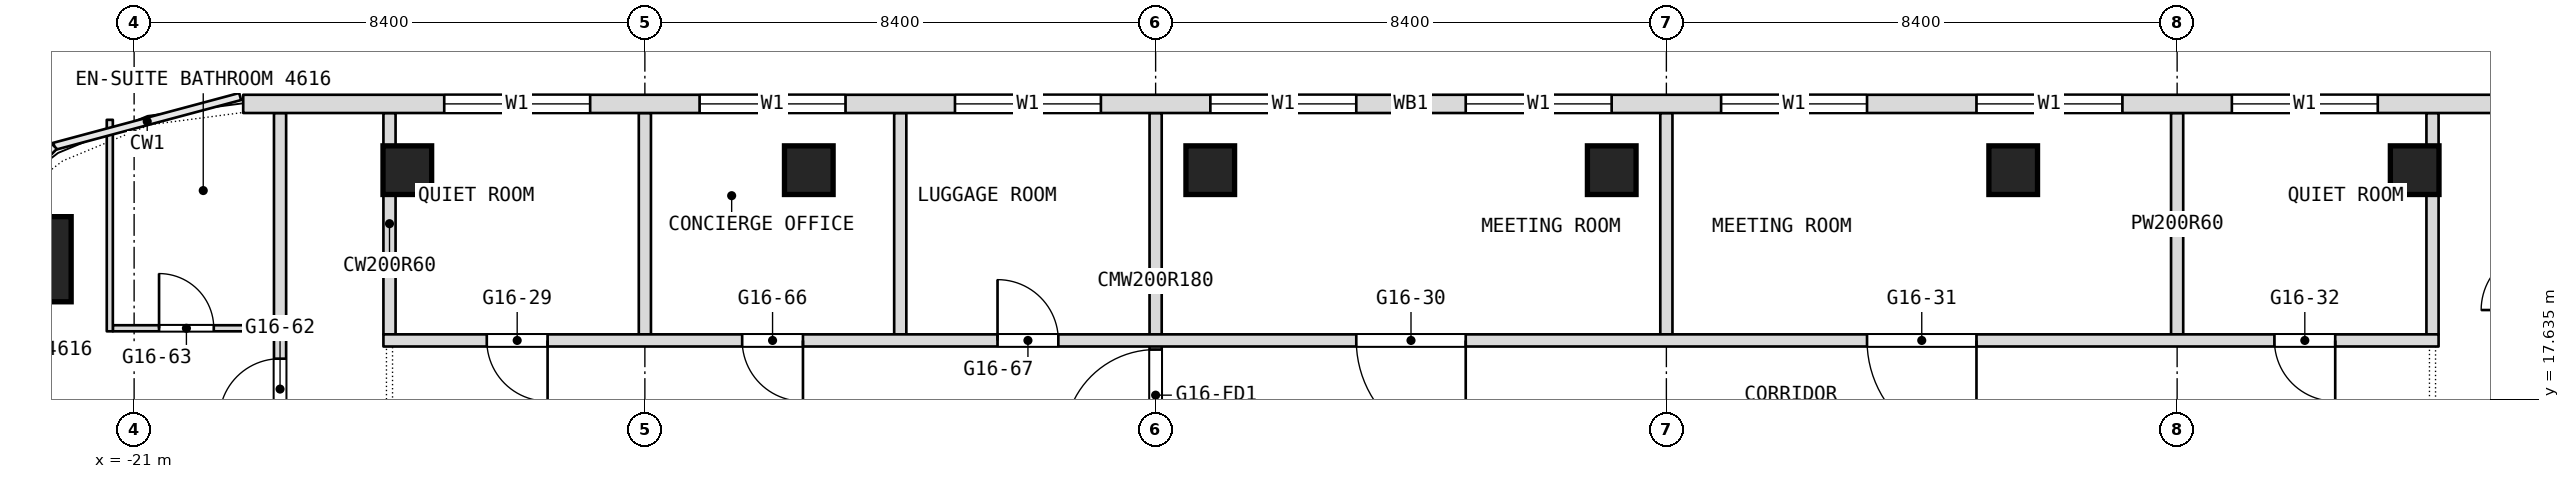
"""IFC4 building model, lengths in metres.
Left out: names, types, materials, properties, quantities, classifications, styles, units other than length and angle.
Written with IfcOpenShell. Run it as: python <this file> out.ifc"""

import sys

from ifc_helpers import new_model, si_unit, direction, frame, frame_2d, origin, origin_2d, place, context, subcontext, project, spatial, rectangle, extrude, element, fill, save


model = new_model("IFC4")
c1 = context("Model", 3, precision=1e-05, world=origin(), true_north=direction((0.0, 1.0)))
c2 = subcontext(c1, "Body", "Model", "MODEL_VIEW")
j1 = project(units=[si_unit("LENGTHUNIT", "METRE"), si_unit("PLANEANGLEUNIT", "RADIAN")], contexts=[c1])
p1 = place(None, origin())
s1 = spatial("IfcSite", under=j1, at=p1, CompositionType="ELEMENT")
p2 = place(p1, origin())
s2 = spatial("IfcBuilding", under=s1, at=p2, CompositionType="ELEMENT")
p3 = place(p2, frame((0.0, 0.0, 202.1)))
s3 = spatial("IfcBuildingStorey", under=s2, at=p3, CompositionType="ELEMENT", Elevation=202.1)
p4 = place(p3, frame((-22.736, 19.936, 0.0), z_axis=(0.0, 0.0, 1.0), x_axis=(1.0, 0.0, 0.0)))
e1 = element("IfcColumn", 1, at=p4, inside=s3, PredefinedType="COLUMN", context=c2, shape_type="SweptSolid", body=[
    extrude(rectangle(XDim=1.4, YDim=1.4, at=origin_2d()), origin(), (0.0, 0.0, 1.0), 3.6),
])
for number, where, z_axis, x_axis in (
    (2, (-16.507, 21.4, 0.0), (0.0, 0.0, 1.0), (1.0, 0.0, 0.0)),
    (3, (-9.904, 21.4, 0.0), (0.0, 0.0, 1.0), (1.0, 0.0, 0.0)),
    (4, (-3.302, 21.4, 0.0), (0.0, 0.0, 1.0), (1.0, 0.0, 0.0)),
    (5, (3.302, 21.4, 0.0), (0.0, 0.0, 1.0), (1.0, 0.0, 0.0)),
    (6, (9.904, 21.4, 0.0), (0.0, 0.0, 1.0), (1.0, 0.0, 0.0)),
    (7, (16.507, 21.4, 0.0), (0.0, 0.0, 1.0), (1.0, 0.0, 0.0)),
):
    element("IfcColumn", number, at=place(p3, frame(where, z_axis=z_axis, x_axis=x_axis)), inside=s3, PredefinedType="COLUMN", context=c2, shape_type="SweptSolid", body=[
        extrude(rectangle(XDim=0.8, YDim=0.8, at=origin_2d()), origin(), (0.0, 0.0, 1.0), 3.6),
    ])
for number, where, z_axis, x_axis in (
    (8, (16.8, 18.7, 0.0), (0.0, 0.0, 1.0), (0.0, 1.0, 0.0)),
    (9, (12.6, 18.7, 0.0), (0.0, 0.0, 1.0), (0.0, 1.0, 0.0)),
    (10, (4.2, 18.7, 0.0), (0.0, 0.0, 1.0), (0.0, 1.0, 0.0)),
):
    element("IfcWall", number, at=place(p3, frame(where, z_axis=z_axis, x_axis=x_axis)), inside=s3, PredefinedType="PARTITIONING", context=c2, shape_type="SweptSolid", body=[
        extrude(rectangle(XDim=3.64, YDim=0.2, at=frame_2d((1.82, 0.0))), origin(), (0.0, 0.0, 1.0), 3.34),
    ])
p5 = place(p3, frame((-4.2, 16.8, 0.0), z_axis=(0.0, 0.0, 1.0), x_axis=(0.0, 1.0, 0.0)))
e11 = element("IfcWall", 11, at=p5, inside=s3, PredefinedType="PARTITIONING", context=c2, shape_type="SweptSolid", body=[
    extrude(rectangle(XDim=5.54, YDim=0.2, at=frame_2d((2.77, 0.0))), origin(), (0.0, 0.0, 1.0), 3.34),
])
p6 = place(p5, frame((0.15, 0.0, 0.0)))
e12 = element("IfcOpeningElement", 12, at=p6, cuts=e11, PredefinedType="OPENING", context=c2, shape_type="SweptSolid", body=[
    extrude(rectangle(XDim=1.5, YDim=2.1, at=frame_2d((0.75, 1.05))), frame((0.0, 0.1, 0.0), z_axis=(0.0, -1.0, 0.0), x_axis=(1.0, 0.0, 0.0)), (0.0, 0.0, 1.0), 0.2),
])
for number, where, z_axis, x_axis in (
    (13, (-8.4, 18.7, 0.0), (0.0, 0.0, 1.0), (0.0, 1.0, 0.0)),
    (14, (-12.6, 18.7, 0.0), (0.0, 0.0, 1.0), (0.0, 1.0, 0.0)),
    (15, (-16.8, 18.7, 0.0), (0.0, 0.0, 1.0), (0.0, 1.0, 0.0)),
):
    element("IfcWall", number, at=place(p3, frame(where, z_axis=z_axis, x_axis=x_axis)), inside=s3, PredefinedType="PARTITIONING", context=c2, shape_type="SweptSolid", body=[
        extrude(rectangle(XDim=3.64, YDim=0.2, at=frame_2d((1.82, 0.0))), origin(), (0.0, 0.0, 1.0), 3.34),
    ])
p7 = place(p3, frame((-18.6, -26.751, 0.0), z_axis=(0.0, 0.0, 1.0), x_axis=(0.0, 1.0, 0.0)))
e16 = element("IfcWall", 16, at=p7, inside=s3, PredefinedType="PARTITIONING", context=c2, shape_type="SweptSolid", body=[
    extrude(rectangle(XDim=49.091, YDim=0.2, at=frame_2d((24.545, 0.0))), origin(), (0.0, 0.0, 1.0), 3.34),
])
p8 = place(p7, frame((4.576, 0.0, 0.0)))
e17 = element("IfcOpeningElement", 17, at=p8, cuts=e16, PredefinedType="OPENING", context=c2, shape_type="SweptSolid", body=[
    extrude(rectangle(XDim=1.1, YDim=2.1, at=frame_2d((0.55, 1.05))), frame((0.0, 0.1, 0.0), z_axis=(0.0, -1.0, 0.0), x_axis=(1.0, 0.0, 0.0)), (0.0, 0.0, 1.0), 0.2),
])
p9 = place(p7, frame((10.351, 0.0, 0.0)))
e18 = element("IfcOpeningElement", 18, at=p9, cuts=e16, PredefinedType="OPENING", context=c2, shape_type="SweptSolid", body=[
    extrude(rectangle(XDim=1.0, YDim=2.1, at=frame_2d((0.5, 1.05))), frame((0.0, 0.1, 0.0), z_axis=(0.0, -1.0, 0.0), x_axis=(1.0, 0.0, 0.0)), (0.0, 0.0, 1.0), 0.2),
])
p10 = place(p7, frame((16.951, 0.0, 0.0)))
e19 = element("IfcOpeningElement", 19, at=p10, cuts=e16, PredefinedType="OPENING", context=c2, shape_type="SweptSolid", body=[
    extrude(rectangle(XDim=1.0, YDim=2.1, at=frame_2d((0.5, 1.05))), frame((0.0, 0.1, 0.0), z_axis=(0.0, -1.0, 0.0), x_axis=(1.0, 0.0, 0.0)), (0.0, 0.0, 1.0), 0.2),
])
p11 = place(p7, frame((22.051, 0.0, 0.0)))
e20 = element("IfcOpeningElement", 20, at=p11, cuts=e16, PredefinedType="OPENING", context=c2, shape_type="SweptSolid", body=[
    extrude(rectangle(XDim=1.1, YDim=2.1, at=frame_2d((0.55, 1.05))), frame((0.0, 0.1, 0.0), z_axis=(0.0, -1.0, 0.0), x_axis=(1.0, 0.0, 0.0)), (0.0, 0.0, 1.0), 0.2),
])
p12 = place(p7, frame((30.351, 0.0, 0.0)))
e21 = element("IfcOpeningElement", 21, at=p12, cuts=e16, PredefinedType="OPENING", context=c2, shape_type="SweptSolid", body=[
    extrude(rectangle(XDim=1.1, YDim=2.1, at=frame_2d((0.55, 1.05))), frame((0.0, 0.1, 0.0), z_axis=(0.0, -1.0, 0.0), x_axis=(1.0, 0.0, 0.0)), (0.0, 0.0, 1.0), 0.2),
])
p13 = place(p7, frame((40.901, 0.0, 0.0)))
e22 = element("IfcOpeningElement", 22, at=p13, cuts=e16, PredefinedType="OPENING", context=c2, shape_type="SweptSolid", body=[
    extrude(rectangle(XDim=1.1, YDim=2.1, at=frame_2d((0.55, 1.05))), frame((0.0, 0.1, 0.0), z_axis=(0.0, -1.0, 0.0), x_axis=(1.0, 0.0, 0.0)), (0.0, 0.0, 1.0), 0.2),
])
p14 = place(p7, frame((44.051, 0.0, 0.0)))
e23 = element("IfcOpeningElement", 23, at=p14, cuts=e16, PredefinedType="OPENING", context=c2, shape_type="SweptSolid", body=[
    extrude(rectangle(XDim=1.0, YDim=2.1, at=frame_2d((0.5, 1.05))), frame((0.0, 0.1, 0.0), z_axis=(0.0, -1.0, 0.0), x_axis=(1.0, 0.0, 0.0)), (0.0, 0.0, 1.0), 0.2),
])
p15 = place(p3, frame((-16.9, 18.6, 0.0), z_axis=(0.0, 0.0, 1.0), x_axis=(1.0, 0.0, 0.0)))
e24 = element("IfcWall", 24, at=p15, inside=s3, PredefinedType="PARTITIONING", context=c2, shape_type="SweptSolid", body=[
    extrude(rectangle(XDim=33.8, YDim=0.2, at=frame_2d((16.9, 0.0))), origin(), (0.0, 0.0, 1.0), 3.34),
])
p16 = place(p15, frame((1.7, 0.0, 0.0)))
e25 = element("IfcOpeningElement", 25, at=p16, cuts=e24, PredefinedType="OPENING", context=c2, shape_type="SweptSolid", body=[
    extrude(rectangle(XDim=1.0, YDim=2.1, at=frame_2d((0.5, 1.05))), frame((0.0, 0.1, 0.0), z_axis=(0.0, -1.0, 0.0), x_axis=(1.0, 0.0, 0.0)), (0.0, 0.0, 1.0), 0.2),
])
p17 = place(p15, frame((16.0, 0.0, 0.0)))
e26 = element("IfcOpeningElement", 26, at=p17, cuts=e24, PredefinedType="OPENING", context=c2, shape_type="SweptSolid", body=[
    extrude(rectangle(XDim=1.8, YDim=2.1, at=frame_2d((0.9, 1.05))), frame((0.0, 0.1, 0.0), z_axis=(0.0, -1.0, 0.0), x_axis=(1.0, 0.0, 0.0)), (0.0, 0.0, 1.0), 0.2),
])
p18 = place(p15, frame((24.4, 0.0, 0.0)))
e27 = element("IfcOpeningElement", 27, at=p18, cuts=e24, PredefinedType="OPENING", context=c2, shape_type="SweptSolid", body=[
    extrude(rectangle(XDim=1.8, YDim=2.1, at=frame_2d((0.9, 1.05))), frame((0.0, 0.1, 0.0), z_axis=(0.0, -1.0, 0.0), x_axis=(1.0, 0.0, 0.0)), (0.0, 0.0, 1.0), 0.2),
])
p19 = place(p15, frame((31.1, 0.0, 0.0)))
e28 = element("IfcOpeningElement", 28, at=p19, cuts=e24, PredefinedType="OPENING", context=c2, shape_type="SweptSolid", body=[
    extrude(rectangle(XDim=1.0, YDim=2.1, at=frame_2d((0.5, 1.05))), frame((0.0, 0.1, 0.0), z_axis=(0.0, -1.0, 0.0), x_axis=(1.0, 0.0, 0.0)), (0.0, 0.0, 1.0), 0.2),
])
p20 = place(p15, frame((5.9, 0.0, 0.0)))
e29 = element("IfcOpeningElement", 29, at=p20, cuts=e24, PredefinedType="OPENING", context=c2, shape_type="SweptSolid", body=[
    extrude(rectangle(XDim=1.0, YDim=2.1, at=frame_2d((0.5, 1.05))), frame((0.0, 0.1, 0.0), z_axis=(0.0, -1.0, 0.0), x_axis=(1.0, 0.0, 0.0)), (0.0, 0.0, 1.0), 0.2),
])
p21 = place(p15, frame((10.1, 0.0, 0.0)))
e30 = element("IfcOpeningElement", 30, at=p21, cuts=e24, PredefinedType="OPENING", context=c2, shape_type="SweptSolid", body=[
    extrude(rectangle(XDim=1.0, YDim=2.1, at=frame_2d((0.5, 1.05))), frame((0.0, 0.1, 0.0), z_axis=(0.0, -1.0, 0.0), x_axis=(1.0, 0.0, 0.0)), (0.0, 0.0, 1.0), 0.2),
])
p22 = place(p3, frame((-21.35, 18.8, 0.0), z_axis=(0.0, 0.0, 1.0), x_axis=(1.0, 0.0, 0.0)))
e31 = element("IfcWall", 31, at=p22, inside=s3, PredefinedType="PARTITIONING", context=c2, shape_type="SweptSolid", body=[
    extrude(rectangle(XDim=2.65, YDim=0.1, at=frame_2d((1.325, 0.0))), origin(), (0.0, 0.0, 1.0), 3.34),
])
p23 = place(p22, frame((0.76, 0.0, 0.0)))
e32 = element("IfcOpeningElement", 32, at=p23, cuts=e31, PredefinedType="OPENING", context=c2, shape_type="SweptSolid", body=[
    extrude(rectangle(XDim=0.9, YDim=2.1, at=frame_2d((0.45, 1.05))), frame((0.0, 0.05, 0.0), z_axis=(0.0, -1.0, 0.0), x_axis=(1.0, 0.0, 0.0)), (0.0, 0.0, 1.0), 0.1),
])
p24 = place(p3, frame((-21.4, 18.75, 0.0), z_axis=(0.0, 0.0, 1.0), x_axis=(0.0, 1.0, 0.0)))
e33 = element("IfcWall", 33, at=p24, inside=s3, PredefinedType="PARTITIONING", context=c2, shape_type="SweptSolid", body=[
    extrude(rectangle(XDim=3.478, YDim=0.1, at=frame_2d((1.739, 0.0))), origin(), (0.0, 0.0, 1.0), 3.34),
])
p25 = place(p3, frame((19.206, 22.49, 0.0), z_axis=(0.0, 0.0, 1.0), x_axis=(-1.0, 0.0, 0.0)))
e34 = element("IfcWall", 34, at=p25, inside=s3, PredefinedType="NOTDEFINED", context=c2, shape_type="SweptSolid", body=[
    extrude(rectangle(XDim=38.412, YDim=0.3, at=frame_2d((19.206, 0.0))), origin(), (0.0, 0.0, 1.0), 3.6),
])
p26 = place(p25, frame((3.306, 0.0, 0.9)))
e35 = element("IfcOpeningElement", 35, at=p26, cuts=e34, PredefinedType="OPENING", context=c2, shape_type="SweptSolid", body=[
    extrude(rectangle(XDim=2.4, YDim=2.1, at=frame_2d((1.2, 1.05))), frame((0.0, 0.15, 0.0), z_axis=(0.0, -1.0, 0.0), x_axis=(1.0, 0.0, 0.0)), (0.0, 0.0, 1.0), 0.3),
])
p27 = place(p25, frame((7.506, 0.0, 0.9)))
e36 = element("IfcOpeningElement", 36, at=p27, cuts=e34, PredefinedType="OPENING", context=c2, shape_type="SweptSolid", body=[
    extrude(rectangle(XDim=2.4, YDim=2.1, at=frame_2d((1.2, 1.05))), frame((0.0, 0.15, 0.0), z_axis=(0.0, -1.0, 0.0), x_axis=(1.0, 0.0, 0.0)), (0.0, 0.0, 1.0), 0.3),
])
p28 = place(p25, frame((11.706, 0.0, 0.9)))
e37 = element("IfcOpeningElement", 37, at=p28, cuts=e34, PredefinedType="OPENING", context=c2, shape_type="SweptSolid", body=[
    extrude(rectangle(XDim=2.4, YDim=2.1, at=frame_2d((1.2, 1.05))), frame((0.0, 0.15, 0.0), z_axis=(0.0, -1.0, 0.0), x_axis=(1.0, 0.0, 0.0)), (0.0, 0.0, 1.0), 0.3),
])
p29 = place(p25, frame((15.906, 0.0, 0.9)))
e38 = element("IfcOpeningElement", 38, at=p29, cuts=e34, PredefinedType="OPENING", context=c2, shape_type="SweptSolid", body=[
    extrude(rectangle(XDim=2.4, YDim=2.1, at=frame_2d((1.2, 1.05))), frame((0.0, 0.15, 0.0), z_axis=(0.0, -1.0, 0.0), x_axis=(1.0, 0.0, 0.0)), (0.0, 0.0, 1.0), 0.3),
])
p30 = place(p25, frame((20.106, 0.0, 0.9)))
e39 = element("IfcOpeningElement", 39, at=p30, cuts=e34, PredefinedType="OPENING", context=c2, shape_type="SweptSolid", body=[
    extrude(rectangle(XDim=2.4, YDim=2.1, at=frame_2d((1.2, 1.05))), frame((0.0, 0.15, 0.0), z_axis=(0.0, -1.0, 0.0), x_axis=(1.0, 0.0, 0.0)), (0.0, 0.0, 1.0), 0.3),
])
p31 = place(p25, frame((24.306, 0.0, 0.9)))
e40 = element("IfcOpeningElement", 40, at=p31, cuts=e34, PredefinedType="OPENING", context=c2, shape_type="SweptSolid", body=[
    extrude(rectangle(XDim=2.4, YDim=2.1, at=frame_2d((1.2, 1.05))), frame((0.0, 0.15, 0.0), z_axis=(0.0, -1.0, 0.0), x_axis=(1.0, 0.0, 0.0)), (0.0, 0.0, 1.0), 0.3),
])
p32 = place(p25, frame((28.506, 0.0, 0.9)))
e41 = element("IfcOpeningElement", 41, at=p32, cuts=e34, PredefinedType="OPENING", context=c2, shape_type="SweptSolid", body=[
    extrude(rectangle(XDim=2.4, YDim=2.1, at=frame_2d((1.2, 1.05))), frame((0.0, 0.15, 0.0), z_axis=(0.0, -1.0, 0.0), x_axis=(1.0, 0.0, 0.0)), (0.0, 0.0, 1.0), 0.3),
])
p33 = place(p25, frame((32.706, 0.0, 0.9)))
e42 = element("IfcOpeningElement", 42, at=p33, cuts=e34, PredefinedType="OPENING", context=c2, shape_type="SweptSolid", body=[
    extrude(rectangle(XDim=2.4, YDim=2.1, at=frame_2d((1.2, 1.05))), frame((0.0, 0.15, 0.0), z_axis=(0.0, -1.0, 0.0), x_axis=(1.0, 0.0, 0.0)), (0.0, 0.0, 1.0), 0.3),
])
p34 = place(p14, origin())
e43 = element("IfcDoor", 43, at=p34, inside=s3, OperationType="SINGLE_SWING_LEFT", PredefinedType="DOOR", context=c2, shape_type="SweptSolid", body=[
    extrude(rectangle(XDim=1.0, YDim=2.1, at=frame_2d((0.5, 1.05))), frame((0.0, 0.025, 0.0), z_axis=(0.0, -1.0, 0.0), x_axis=(1.0, 0.0, 0.0)), (0.0, 0.0, 1.0), 0.05),
])
fill(e23, e43)
p35 = place(p16, origin())
e44 = element("IfcDoor", 44, at=p35, inside=s3, OperationType="SINGLE_SWING_LEFT", PredefinedType="DOOR", context=c2, shape_type="SweptSolid", body=[
    extrude(rectangle(XDim=1.0, YDim=2.1, at=frame_2d((0.5, 1.05))), frame((0.0, 0.025, 0.0), z_axis=(0.0, -1.0, 0.0), x_axis=(1.0, 0.0, 0.0)), (0.0, 0.0, 1.0), 0.05),
])
fill(e25, e44)
p36 = place(p17, origin())
e45 = element("IfcDoor", 45, at=p36, inside=s3, OperationType="DOUBLE_DOOR_SINGLE_SWING", PredefinedType="DOOR", context=c2, shape_type="SweptSolid", body=[
    extrude(rectangle(XDim=1.8, YDim=2.1, at=frame_2d((0.9, 1.05))), frame((0.0, 0.025, 0.0), z_axis=(0.0, -1.0, 0.0), x_axis=(1.0, 0.0, 0.0)), (0.0, 0.0, 1.0), 0.05),
])
fill(e26, e45)
p37 = place(p18, origin())
e46 = element("IfcDoor", 46, at=p37, inside=s3, OperationType="DOUBLE_DOOR_SINGLE_SWING", PredefinedType="DOOR", context=c2, shape_type="SweptSolid", body=[
    extrude(rectangle(XDim=1.8, YDim=2.1, at=frame_2d((0.9, 1.05))), frame((0.0, 0.025, 0.0), z_axis=(0.0, -1.0, 0.0), x_axis=(1.0, 0.0, 0.0)), (0.0, 0.0, 1.0), 0.05),
])
fill(e27, e46)
p38 = place(p19, origin())
e47 = element("IfcDoor", 47, at=p38, inside=s3, OperationType="SINGLE_SWING_RIGHT", PredefinedType="DOOR", context=c2, shape_type="SweptSolid", body=[
    extrude(rectangle(XDim=1.0, YDim=2.1, at=frame_2d((0.5, 1.05))), frame((0.0, 0.025, 0.0), z_axis=(0.0, -1.0, 0.0), x_axis=(1.0, 0.0, 0.0)), (0.0, 0.0, 1.0), 0.05),
])
fill(e28, e47)
p39 = place(p20, origin())
e48 = element("IfcDoor", 48, at=p39, inside=s3, OperationType="SINGLE_SWING_RIGHT", PredefinedType="DOOR", context=c2, shape_type="SweptSolid", body=[
    extrude(rectangle(XDim=1.0, YDim=2.1, at=frame_2d((0.5, 1.05))), frame((0.0, 0.025, 0.0), z_axis=(0.0, -1.0, 0.0), x_axis=(1.0, 0.0, 0.0)), (0.0, 0.0, 1.0), 0.05),
])
fill(e29, e48)
p40 = place(p21, origin())
e49 = element("IfcDoor", 49, at=p40, inside=s3, OperationType="SINGLE_SWING_LEFT", PredefinedType="DOOR", context=c2, shape_type="SweptSolid", body=[
    extrude(rectangle(XDim=1.0, YDim=2.1, at=frame_2d((0.5, 1.05))), frame((0.0, 0.025, 0.0), z_axis=(0.0, -1.0, 0.0), x_axis=(1.0, 0.0, 0.0)), (0.0, 0.0, 1.0), 0.05),
])
fill(e30, e49)
p41 = place(p23, origin())
e50 = element("IfcDoor", 50, at=p41, inside=s3, OperationType="SINGLE_SWING_LEFT", PredefinedType="DOOR", context=c2, shape_type="SweptSolid", body=[
    extrude(rectangle(XDim=0.9, YDim=2.1, at=frame_2d((0.45, 1.05))), frame((0.0, 0.025, 0.0), z_axis=(0.0, -1.0, 0.0), x_axis=(1.0, 0.0, 0.0)), (0.0, 0.0, 1.0), 0.05),
])
fill(e32, e50)
p42 = place(p26, origin())
e51 = element("IfcWindow", 51, at=p42, inside=s3, PartitioningType="SINGLE_PANEL", PredefinedType="WINDOW", context=c2, shape_type="SweptSolid", body=[
    extrude(rectangle(XDim=2.4, YDim=2.1, at=frame_2d((1.2, 1.05))), frame((0.0, 0.03, 0.0), z_axis=(0.0, -1.0, 0.0), x_axis=(1.0, 0.0, 0.0)), (0.0, 0.0, 1.0), 0.06),
])
fill(e35, e51)
p43 = place(p27, origin())
e52 = element("IfcWindow", 52, at=p43, inside=s3, PartitioningType="SINGLE_PANEL", PredefinedType="WINDOW", context=c2, shape_type="SweptSolid", body=[
    extrude(rectangle(XDim=2.4, YDim=2.1, at=frame_2d((1.2, 1.05))), frame((0.0, 0.03, 0.0), z_axis=(0.0, -1.0, 0.0), x_axis=(1.0, 0.0, 0.0)), (0.0, 0.0, 1.0), 0.06),
])
fill(e36, e52)
p44 = place(p28, origin())
e53 = element("IfcWindow", 53, at=p44, inside=s3, PartitioningType="SINGLE_PANEL", PredefinedType="WINDOW", context=c2, shape_type="SweptSolid", body=[
    extrude(rectangle(XDim=2.4, YDim=2.1, at=frame_2d((1.2, 1.05))), frame((0.0, 0.03, 0.0), z_axis=(0.0, -1.0, 0.0), x_axis=(1.0, 0.0, 0.0)), (0.0, 0.0, 1.0), 0.06),
])
fill(e37, e53)
p45 = place(p29, origin())
e54 = element("IfcWindow", 54, at=p45, inside=s3, PartitioningType="SINGLE_PANEL", PredefinedType="WINDOW", context=c2, shape_type="SweptSolid", body=[
    extrude(rectangle(XDim=2.4, YDim=2.1, at=frame_2d((1.2, 1.05))), frame((0.0, 0.03, 0.0), z_axis=(0.0, -1.0, 0.0), x_axis=(1.0, 0.0, 0.0)), (0.0, 0.0, 1.0), 0.06),
])
fill(e38, e54)
p46 = place(p30, origin())
e55 = element("IfcWindow", 55, at=p46, inside=s3, PartitioningType="SINGLE_PANEL", PredefinedType="WINDOW", context=c2, shape_type="SweptSolid", body=[
    extrude(rectangle(XDim=2.4, YDim=2.1, at=frame_2d((1.2, 1.05))), frame((0.0, 0.03, 0.0), z_axis=(0.0, -1.0, 0.0), x_axis=(1.0, 0.0, 0.0)), (0.0, 0.0, 1.0), 0.06),
])
fill(e39, e55)
p47 = place(p31, origin())
e56 = element("IfcWindow", 56, at=p47, inside=s3, PartitioningType="SINGLE_PANEL", PredefinedType="WINDOW", context=c2, shape_type="SweptSolid", body=[
    extrude(rectangle(XDim=2.4, YDim=2.1, at=frame_2d((1.2, 1.05))), frame((0.0, 0.03, 0.0), z_axis=(0.0, -1.0, 0.0), x_axis=(1.0, 0.0, 0.0)), (0.0, 0.0, 1.0), 0.06),
])
fill(e40, e56)
p48 = place(p32, origin())
e57 = element("IfcWindow", 57, at=p48, inside=s3, PartitioningType="SINGLE_PANEL", PredefinedType="WINDOW", context=c2, shape_type="SweptSolid", body=[
    extrude(rectangle(XDim=2.4, YDim=2.1, at=frame_2d((1.2, 1.05))), frame((0.0, 0.03, 0.0), z_axis=(0.0, -1.0, 0.0), x_axis=(1.0, 0.0, 0.0)), (0.0, 0.0, 1.0), 0.06),
])
fill(e41, e57)
p49 = place(p33, origin())
e58 = element("IfcWindow", 58, at=p49, inside=s3, PartitioningType="SINGLE_PANEL", PredefinedType="WINDOW", context=c2, shape_type="SweptSolid", body=[
    extrude(rectangle(XDim=2.4, YDim=2.1, at=frame_2d((1.2, 1.05))), frame((0.0, 0.03, 0.0), z_axis=(0.0, -1.0, 0.0), x_axis=(1.0, 0.0, 0.0)), (0.0, 0.0, 1.0), 0.06),
])
fill(e42, e58)
p50 = place(p6, origin())
e59 = element("IfcDoor", 59, at=p50, inside=s3, OperationType="DOUBLE_DOOR_DOUBLE_SWING", PredefinedType="DOOR", context=c2, shape_type="SweptSolid", body=[
    extrude(rectangle(XDim=1.5, YDim=2.1, at=frame_2d((0.75, 1.05))), frame((0.0, 0.025, 0.0), z_axis=(0.0, -1.0, 0.0), x_axis=(1.0, 0.0, 0.0)), (0.0, 0.0, 1.0), 0.05),
])
fill(e12, e59)
save(model, sys.argv[1])
